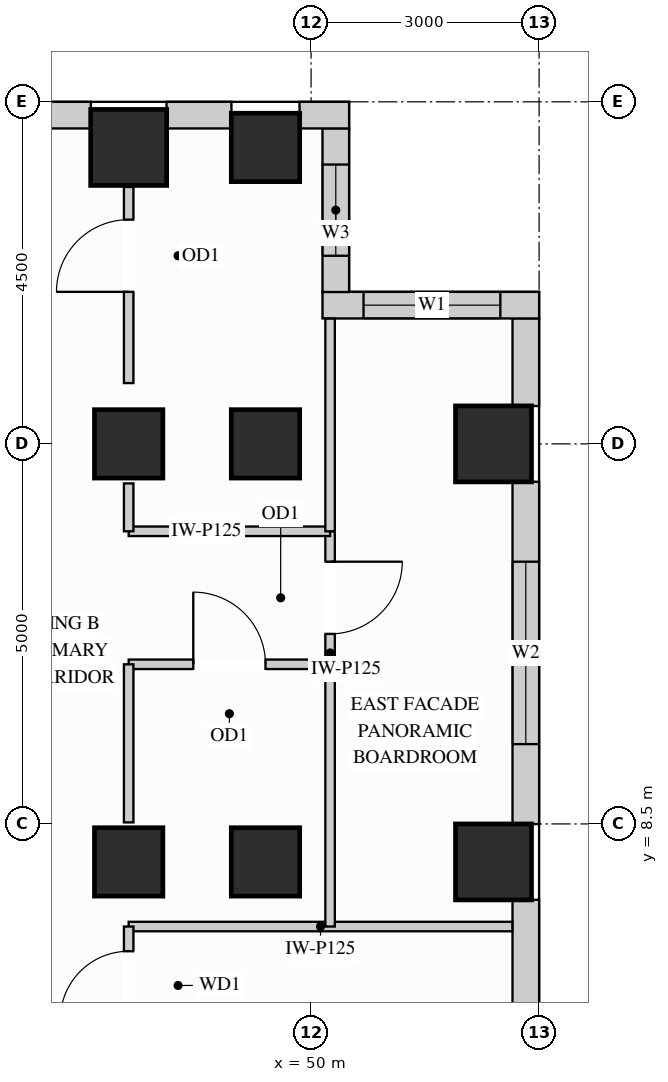
"""IFC4 building model, lengths in metres.
Left out: names, types, materials, properties, quantities, classifications, styles, units other than length and angle.
Written with IfcOpenShell. Run it as: python <this file> out.ifc"""

import sys

from ifc_helpers import new_model, si_unit, direction, frame, frame_2d, origin, origin_2d, place, context, subcontext, project, spatial, rectangle, extrude, source, transform, mapped, element, fill, save


model = new_model("IFC4")
c1 = context("Model", 3, precision=1e-05, world=origin(), true_north=direction((0.0, 1.0)))
c2 = subcontext(c1, "Body", "Model", "MODEL_VIEW")
j1 = project(units=[si_unit("LENGTHUNIT", "METRE"), si_unit("PLANEANGLEUNIT", "RADIAN")], contexts=[c1])
p1 = place(None, origin())
s1 = spatial("IfcSite", under=j1, at=p1, CompositionType="ELEMENT")
p2 = place(p1, origin())
s2 = spatial("IfcBuilding", under=s1, at=p2, CompositionType="ELEMENT")
p3 = place(p2, frame((0.0, 0.0, 189.9)))
s3 = spatial("IfcBuildingStorey", under=s2, at=p3, CompositionType="ELEMENT", Elevation=189.9)
m1 = source(origin(), c2, "Body", "SweptSolid", [
    extrude(rectangle(XDim=0.9, YDim=0.9, at=origin_2d()), origin(), (0.0, 0.0, 1.0), 3.4),
])
for number, where, z_axis, x_axis in (
    (1, (47.6, 13.5, 0.0), (0.0, 0.0, 1.0), (1.0, 0.0, 0.0)),
    (2, (47.6, 8.0, 0.0), (0.0, 0.0, 1.0), (1.0, 0.0, 0.0)),
    (3, (49.4, 13.5, 0.0), (0.0, 0.0, 1.0), (1.0, 0.0, 0.0)),
    (4, (49.4, 17.4, 0.0), (0.0, 0.0, 1.0), (1.0, 0.0, 0.0)),
    (5, (49.4, 8.0, 0.0), (0.0, 0.0, 1.0), (1.0, 0.0, 0.0)),
):
    element("IfcColumn", number, at=place(p3, frame(where, z_axis=z_axis, x_axis=x_axis)), inside=s3, PredefinedType="COLUMN", context=c2, shape_type="MappedRepresentation", body=[
        mapped(m1, transform((0.0, 0.0, 0.0), x_axis=(1.0, 0.0, 0.0), y_axis=(0.0, 1.0, 0.0), z_axis=(0.0, 0.0, 1.0))),
    ])
m2 = source(origin(), c2, "Body", "SweptSolid", [
    extrude(rectangle(XDim=1.0, YDim=1.0, at=origin_2d()), origin(), (0.0, 0.0, 1.0), 3.4),
])
for number, where, z_axis, x_axis in (
    (6, (47.6, 17.4, 0.0), (0.0, 0.0, 1.0), (1.0, 0.0, 0.0)),
    (7, (52.4, 13.5, 0.0), (0.0, 0.0, 1.0), (1.0, 0.0, 0.0)),
    (8, (52.4, 8.0, 0.0), (0.0, 0.0, 1.0), (1.0, 0.0, 0.0)),
):
    element("IfcColumn", number, at=place(p3, frame(where, z_axis=z_axis, x_axis=x_axis)), inside=s3, PredefinedType="COLUMN", context=c2, shape_type="MappedRepresentation", body=[
        mapped(m2, transform((0.0, 0.0, 0.0), x_axis=(1.0, 0.0, 0.0), y_axis=(0.0, 1.0, 0.0), z_axis=(0.0, 0.0, 1.0))),
    ])
m3 = source(origin(), c2, "Body", "SweptSolid", [
    extrude(rectangle(XDim=3.504, YDim=0.35, at=frame_2d((1.752, 0.0))), origin(), (0.0, 0.0, 1.0), 2.612),
])
p4 = place(p3, frame((52.825, 3.998, 0.0), z_axis=(0.0, 0.0, 1.0), x_axis=(0.0, 1.0, 0.0)))
e9 = element("IfcWall", 9, at=p4, inside=s3, PredefinedType="SOLIDWALL", context=c2, shape_type="MappedRepresentation", body=[
    mapped(m3, transform((0.0, 0.0, 0.0), x_axis=(1.0, 0.0, 0.0), y_axis=(0.0, 1.0, 0.0), z_axis=(0.0, 0.0, 1.0))),
])
p5 = place(p3, frame((52.825, 8.498, 0.0), z_axis=(0.0, 0.0, 1.0), x_axis=(0.0, 1.0, 0.0)))
e10 = element("IfcWall", 10, at=p5, inside=s3, PredefinedType="SOLIDWALL", context=c2, shape_type="SweptSolid", body=[
    extrude(rectangle(XDim=4.504, YDim=0.35, at=frame_2d((2.252, 0.0))), origin(), (0.0, 0.0, 1.0), 2.612),
])
p6 = place(p5, frame((1.052, 0.0, 0.78)))
e11 = element("IfcOpeningElement", 11, at=p6, cuts=e10, PredefinedType="OPENING", context=c2, shape_type="SweptSolid", body=[
    extrude(rectangle(XDim=2.4, YDim=1.652, at=frame_2d((1.2, 0.826))), frame((0.0, 0.185, 0.0), z_axis=(0.0, -1.0, 0.0), x_axis=(1.0, 0.0, 0.0)), (0.0, 0.0, 1.0), 0.37),
])
m4 = source(origin(), c2, "Body", "SweptSolid", [
    extrude(rectangle(XDim=1.154, YDim=0.35, at=frame_2d((0.577, 0.0))), origin(), (0.0, 0.0, 1.0), 3.385),
])
p7 = place(p3, frame((52.825, 13.998, 0.0), z_axis=(0.0, 0.0, 1.0), x_axis=(0.0, 1.0, 0.0)))
e12 = element("IfcWall", 12, at=p7, inside=s3, PredefinedType="SOLIDWALL", context=c2, shape_type="MappedRepresentation", body=[
    mapped(m4, transform((0.0, 0.0, 0.0), x_axis=(1.0, 0.0, 0.0), y_axis=(0.0, 1.0, 0.0), z_axis=(0.0, 0.0, 1.0))),
])
p8 = place(p3, frame((53.0, 15.325, 0.0), z_axis=(0.0, 0.0, 1.0), x_axis=(-1.0, 0.0, 0.0)))
e13 = element("IfcWall", 13, at=p8, inside=s3, PredefinedType="SOLIDWALL", context=c2, shape_type="SweptSolid", body=[
    extrude(rectangle(XDim=2.85, YDim=0.35, at=frame_2d((1.425, 0.0))), origin(), (0.0, 0.0, 1.0), 3.385),
])
p9 = place(p8, frame((0.51, 0.0, 0.78)))
e14 = element("IfcOpeningElement", 14, at=p9, cuts=e13, PredefinedType="OPENING", context=c2, shape_type="SweptSolid", body=[
    extrude(rectangle(XDim=1.8, YDim=2.1, at=frame_2d((0.9, 1.05))), frame((0.0, 0.185, 0.0), z_axis=(0.0, -1.0, 0.0), x_axis=(1.0, 0.0, 0.0)), (0.0, 0.0, 1.0), 0.37),
])
p10 = place(p3, frame((50.325, 15.498, 0.0), z_axis=(0.0, 0.0, 1.0), x_axis=(0.0, 1.0, 0.0)))
e15 = element("IfcWall", 15, at=p10, inside=s3, PredefinedType="SOLIDWALL", context=c2, shape_type="SweptSolid", body=[
    extrude(rectangle(XDim=2.154, YDim=0.35, at=frame_2d((1.077, 0.0))), origin(), (0.0, 0.0, 1.0), 3.385),
])
p11 = place(p10, frame((0.477, 0.0, 0.78)))
e16 = element("IfcOpeningElement", 16, at=p11, cuts=e15, PredefinedType="OPENING", context=c2, shape_type="SweptSolid", body=[
    extrude(rectangle(XDim=1.2, YDim=2.1, at=frame_2d((0.6, 1.05))), frame((0.0, 0.185, 0.0), z_axis=(0.0, -1.0, 0.0), x_axis=(1.0, 0.0, 0.0)), (0.0, 0.0, 1.0), 0.37),
])
m5 = source(origin(), c2, "Body", "SweptSolid", [
    extrude(rectangle(XDim=0.652, YDim=0.35, at=frame_2d((0.326, 0.0))), origin(), (0.0, 0.0, 1.0), 3.385),
])
p12 = place(p3, frame((50.5, 17.825, 0.0), z_axis=(0.0, 0.0, 1.0), x_axis=(-1.0, 0.0, 0.0)))
e17 = element("IfcWall", 17, at=p12, inside=s3, PredefinedType="SOLIDWALL", context=c2, shape_type="MappedRepresentation", body=[
    mapped(m5, transform((0.0, 0.0, 0.0), x_axis=(1.0, 0.0, 0.0), y_axis=(0.0, 1.0, 0.0), z_axis=(0.0, 0.0, 1.0))),
])
m6 = source(origin(), c2, "Body", "SweptSolid", [
    extrude(rectangle(XDim=0.854, YDim=0.35, at=frame_2d((0.427, 0.0))), origin(), (0.0, 0.0, 1.0), 3.385),
])
p13 = place(p3, frame((48.952, 17.825, 0.0), z_axis=(0.0, 0.0, 1.0), x_axis=(-1.0, 0.0, 0.0)))
e18 = element("IfcWall", 18, at=p13, inside=s3, PredefinedType="SOLIDWALL", context=c2, shape_type="MappedRepresentation", body=[
    mapped(m6, transform((0.0, 0.0, 0.0), x_axis=(1.0, 0.0, 0.0), y_axis=(0.0, 1.0, 0.0), z_axis=(0.0, 0.0, 1.0))),
])
p14 = place(p3, frame((47.102, 17.825, 0.0), z_axis=(0.0, 0.0, 1.0), x_axis=(-1.0, 0.0, 0.0)))
e19 = element("IfcWall", 19, at=p14, inside=s3, PredefinedType="SOLIDWALL", context=c2, shape_type="SweptSolid", body=[
    extrude(rectangle(XDim=6.604, YDim=0.35, at=frame_2d((3.302, 0.0))), origin(), (0.0, 0.0, 1.0), 2.612),
])
p15 = place(p14, frame((1.849, 0.0, 0.78)))
e20 = element("IfcOpeningElement", 20, at=p15, cuts=e19, PredefinedType="OPENING", context=c2, shape_type="SweptSolid", body=[
    extrude(rectangle(XDim=1.8, YDim=1.652, at=frame_2d((0.9, 0.826))), frame((0.0, 0.185, 0.0), z_axis=(0.0, -1.0, 0.0), x_axis=(1.0, 0.0, 0.0)), (0.0, 0.0, 1.0), 0.37),
])
p16 = place(p14, frame((4.067, 0.0, 0.78)))
e21 = element("IfcOpeningElement", 21, at=p16, cuts=e19, PredefinedType="OPENING", context=c2, shape_type="SweptSolid", body=[
    extrude(rectangle(XDim=1.8, YDim=1.652, at=frame_2d((0.9, 0.826))), frame((0.0, 0.185, 0.0), z_axis=(0.0, -1.0, 0.0), x_axis=(1.0, 0.0, 0.0)), (0.0, 0.0, 1.0), 0.37),
])
p17 = place(p3, frame((50.25, 10.6, 0.0), z_axis=(0.0, 0.0, 1.0), x_axis=(0.0, 1.0, 0.0)))
e22 = element("IfcWall", 22, at=p17, inside=s3, PredefinedType="PARTITIONING", context=c2, shape_type="SweptSolid", body=[
    extrude(rectangle(XDim=1.75, YDim=0.125, at=frame_2d((0.875, 0.0))), origin(), (0.0, 0.0, 1.0), 3.385),
])
p18 = place(p17, frame((0.4, 0.0, 0.0)))
e23 = element("IfcOpeningElement", 23, at=p18, cuts=e22, PredefinedType="OPENING", context=c2, shape_type="SweptSolid", body=[
    extrude(rectangle(XDim=0.95, YDim=2.15, at=frame_2d((0.475, 1.075))), frame((0.0, 0.073, 0.0), z_axis=(0.0, -1.0, 0.0), x_axis=(1.0, 0.0, 0.0)), (0.0, 0.0, 1.0), 0.145),
])
m7 = source(origin(), c2, "Body", "SweptSolid", [
    extrude(rectangle(XDim=5.048, YDim=0.125, at=frame_2d((2.524, 0.0))), origin(), (0.0, 0.0, 1.0), 3.385),
])
p19 = place(p3, frame((47.6, 7.15, 0.0), z_axis=(0.0, 0.0, 1.0), x_axis=(1.0, 0.0, 0.0)))
e24 = element("IfcWall", 24, at=p19, inside=s3, PredefinedType="PARTITIONING", context=c2, shape_type="MappedRepresentation", body=[
    mapped(m7, transform((0.0, 0.0, 0.0), x_axis=(1.0, 0.0, 0.0), y_axis=(0.0, 1.0, 0.0), z_axis=(0.0, 0.0, 1.0))),
])
m8 = source(origin(), c2, "Body", "SweptSolid", [
    extrude(rectangle(XDim=2.65, YDim=0.125, at=frame_2d((1.325, 0.0))), origin(), (0.0, 0.0, 1.0), 3.385),
])
p20 = place(p3, frame((47.6, 12.35, 0.0), z_axis=(0.0, 0.0, 1.0), x_axis=(1.0, 0.0, 0.0)))
e25 = element("IfcWall", 25, at=p20, inside=s3, PredefinedType="PARTITIONING", context=c2, shape_type="MappedRepresentation", body=[
    mapped(m8, transform((0.0, 0.0, 0.0), x_axis=(1.0, 0.0, 0.0), y_axis=(0.0, 1.0, 0.0), z_axis=(0.0, 0.0, 1.0))),
])
p21 = place(p3, frame((47.6, 10.6, 0.0), z_axis=(0.0, 0.0, 1.0), x_axis=(1.0, 0.0, 0.0)))
e26 = element("IfcWall", 26, at=p21, inside=s3, PredefinedType="PARTITIONING", context=c2, shape_type="SweptSolid", body=[
    extrude(rectangle(XDim=2.65, YDim=0.125, at=frame_2d((1.325, 0.0))), origin(), (0.0, 0.0, 1.0), 2.773),
])
p22 = place(p21, frame((0.85, 0.0, 0.0)))
e27 = element("IfcOpeningElement", 27, at=p22, cuts=e26, PredefinedType="OPENING", context=c2, shape_type="SweptSolid", body=[
    extrude(rectangle(XDim=0.95, YDim=2.15, at=frame_2d((0.475, 1.075))), frame((0.0, 0.073, 0.0), z_axis=(0.0, -1.0, 0.0), x_axis=(1.0, 0.0, 0.0)), (0.0, 0.0, 1.0), 0.145),
])
m9 = source(origin(), c2, "Body", "SweptSolid", [
    extrude(rectangle(XDim=3.45, YDim=0.125, at=frame_2d((1.725, 0.0))), origin(), (0.0, 0.0, 1.0), 3.385),
])
p23 = place(p3, frame((50.25, 7.15, 0.0), z_axis=(0.0, 0.0, 1.0), x_axis=(0.0, 1.0, 0.0)))
e28 = element("IfcWall", 28, at=p23, inside=s3, PredefinedType="PARTITIONING", context=c2, shape_type="MappedRepresentation", body=[
    mapped(m9, transform((0.0, 0.0, 0.0), x_axis=(1.0, 0.0, 0.0), y_axis=(0.0, 1.0, 0.0), z_axis=(0.0, 0.0, 1.0))),
])
m10 = source(origin(), c2, "Body", "SweptSolid", [
    extrude(rectangle(XDim=2.798, YDim=0.125, at=frame_2d((1.399, 0.0))), origin(), (0.0, 0.0, 1.0), 3.385),
])
p24 = place(p3, frame((50.25, 12.35, 0.0), z_axis=(0.0, 0.0, 1.0), x_axis=(0.0, 1.0, 0.0)))
e29 = element("IfcWall", 29, at=p24, inside=s3, PredefinedType="PARTITIONING", context=c2, shape_type="MappedRepresentation", body=[
    mapped(m10, transform((0.0, 0.0, 0.0), x_axis=(1.0, 0.0, 0.0), y_axis=(0.0, 1.0, 0.0), z_axis=(0.0, 0.0, 1.0))),
])
m11 = source(origin(), c2, "Body", "SweptSolid", [
    extrude(rectangle(XDim=2.08, YDim=0.125, at=frame_2d((1.04, 0.0))), origin(), (0.0, 0.0, 1.0), 2.773),
])
p25 = place(p3, frame((47.6, 8.52, 0.0), z_axis=(0.0, 0.0, 1.0), x_axis=(0.0, 1.0, 0.0)))
e30 = element("IfcWall", 30, at=p25, inside=s3, PredefinedType="PARTITIONING", context=c2, shape_type="MappedRepresentation", body=[
    mapped(m11, transform((0.0, 0.0, 0.0), x_axis=(1.0, 0.0, 0.0), y_axis=(0.0, 1.0, 0.0), z_axis=(0.0, 0.0, 1.0))),
])
p26 = place(p3, frame((47.6, 14.3, 0.0), z_axis=(0.0, 0.0, 1.0), x_axis=(0.0, 1.0, 0.0)))
e31 = element("IfcWall", 31, at=p26, inside=s3, PredefinedType="PARTITIONING", context=c2, shape_type="SweptSolid", body=[
    extrude(rectangle(XDim=2.58, YDim=0.125, at=frame_2d((1.29, 0.0))), origin(), (0.0, 0.0, 1.0), 2.773),
])
p27 = place(p26, frame((1.2, 0.0, 0.0)))
e32 = element("IfcOpeningElement", 32, at=p27, cuts=e31, PredefinedType="OPENING", context=c2, shape_type="SweptSolid", body=[
    extrude(rectangle(XDim=0.95, YDim=2.15, at=frame_2d((0.475, 1.075))), frame((0.0, 0.073, 0.0), z_axis=(0.0, -1.0, 0.0), x_axis=(1.0, 0.0, 0.0)), (0.0, 0.0, 1.0), 0.145),
])
m12 = source(origin(), c2, "Body", "SweptSolid", [
    extrude(rectangle(XDim=0.63, YDim=0.125, at=frame_2d((0.315, 0.0))), origin(), (0.0, 0.0, 1.0), 2.773),
])
p28 = place(p3, frame((47.6, 12.35, 0.0), z_axis=(0.0, 0.0, 1.0), x_axis=(0.0, 1.0, 0.0)))
e33 = element("IfcWall", 33, at=p28, inside=s3, PredefinedType="PARTITIONING", context=c2, shape_type="MappedRepresentation", body=[
    mapped(m12, transform((0.0, 0.0, 0.0), x_axis=(1.0, 0.0, 0.0), y_axis=(0.0, 1.0, 0.0), z_axis=(0.0, 0.0, 1.0))),
])
p29 = place(p3, frame((47.6, 5.65, 0.0), z_axis=(0.0, 0.0, 1.0), x_axis=(0.0, 1.0, 0.0)))
e34 = element("IfcWall", 34, at=p29, inside=s3, PredefinedType="PARTITIONING", context=c2, shape_type="SweptSolid", body=[
    extrude(rectangle(XDim=1.5, YDim=0.125, at=frame_2d((0.75, 0.0))), origin(), (0.0, 0.0, 1.0), 2.773),
])
p30 = place(p29, frame((0.275, 0.0, 0.0)))
e35 = element("IfcOpeningElement", 35, at=p30, cuts=e34, PredefinedType="OPENING", context=c2, shape_type="SweptSolid", body=[
    extrude(rectangle(XDim=0.9, YDim=2.15, at=frame_2d((0.45, 1.075))), frame((0.0, 0.073, 0.0), z_axis=(0.0, -1.0, 0.0), x_axis=(1.0, 0.0, 0.0)), (0.0, 0.0, 1.0), 0.145),
])
m13 = source(origin(), c2, "Body", "SweptSolid", [
    extrude(rectangle(XDim=0.95, YDim=2.15, at=frame_2d((0.475, 1.075))), frame((0.0, 0.025, 0.0), z_axis=(0.0, -1.0, 0.0), x_axis=(1.0, 0.0, 0.0)), (0.0, 0.0, 1.0), 0.05),
])
p31 = place(p22, origin())
e36 = element("IfcDoor", 36, at=p31, inside=s3, OperationType="SINGLE_SWING_LEFT", PredefinedType="DOOR", context=c2, shape_type="MappedRepresentation", body=[
    mapped(m13, transform((0.0, 0.0, 0.0), x_axis=(1.0, 0.0, 0.0), y_axis=(0.0, 1.0, 0.0), z_axis=(0.0, 0.0, 1.0))),
])
fill(e27, e36)
p32 = place(p18, origin())
e37 = element("IfcDoor", 37, at=p32, inside=s3, OperationType="SINGLE_SWING_RIGHT", PredefinedType="DOOR", context=c2, shape_type="MappedRepresentation", body=[
    mapped(m13, transform((0.0, 0.0, 0.0), x_axis=(1.0, 0.0, 0.0), y_axis=(0.0, 1.0, 0.0), z_axis=(0.0, 0.0, 1.0))),
])
fill(e23, e37)
p33 = place(p27, origin())
e38 = element("IfcDoor", 38, at=p33, inside=s3, OperationType="SINGLE_SWING_LEFT", PredefinedType="DOOR", context=c2, shape_type="MappedRepresentation", body=[
    mapped(m13, transform((0.0, 0.0, 0.0), x_axis=(1.0, 0.0, 0.0), y_axis=(0.0, 1.0, 0.0), z_axis=(0.0, 0.0, 1.0))),
])
fill(e32, e38)
m14 = source(origin(), c2, "Body", "SweptSolid", [
    extrude(rectangle(XDim=0.9, YDim=2.15, at=frame_2d((0.45, 1.075))), frame((0.0, 0.025, 0.0), z_axis=(0.0, -1.0, 0.0), x_axis=(1.0, 0.0, 0.0)), (0.0, 0.0, 1.0), 0.05),
])
p34 = place(p30, origin())
e39 = element("IfcDoor", 39, at=p34, inside=s3, OperationType="SINGLE_SWING_LEFT", PredefinedType="DOOR", context=c2, shape_type="MappedRepresentation", body=[
    mapped(m14, transform((0.0, 0.0, 0.0), x_axis=(1.0, 0.0, 0.0), y_axis=(0.0, 1.0, 0.0), z_axis=(0.0, 0.0, 1.0))),
])
fill(e35, e39)
m15 = source(origin(), c2, "Body", "SweptSolid", [
    extrude(rectangle(XDim=1.8, YDim=2.1, at=frame_2d((0.9, 1.05))), frame((0.0, 0.03, 0.0), z_axis=(0.0, -1.0, 0.0), x_axis=(1.0, 0.0, 0.0)), (0.0, 0.0, 1.0), 0.06),
])
p35 = place(p9, origin())
e40 = element("IfcWindow", 40, at=p35, inside=s3, PartitioningType="SINGLE_PANEL", PredefinedType="WINDOW", context=c2, shape_type="MappedRepresentation", body=[
    mapped(m15, transform((0.0, 0.0, 0.0), x_axis=(1.0, 0.0, 0.0), y_axis=(0.0, 1.0, 0.0), z_axis=(0.0, 0.0, 1.0))),
])
fill(e14, e40)
m16 = source(origin(), c2, "Body", "SweptSolid", [
    extrude(rectangle(XDim=2.4, YDim=1.652, at=frame_2d((1.2, 0.826))), frame((0.0, 0.03, 0.0), z_axis=(0.0, -1.0, 0.0), x_axis=(1.0, 0.0, 0.0)), (0.0, 0.0, 1.0), 0.06),
])
p36 = place(p6, origin())
e41 = element("IfcWindow", 41, at=p36, inside=s3, PartitioningType="SINGLE_PANEL", PredefinedType="WINDOW", context=c2, shape_type="MappedRepresentation", body=[
    mapped(m16, transform((0.0, 0.0, 0.0), x_axis=(1.0, 0.0, 0.0), y_axis=(0.0, 1.0, 0.0), z_axis=(0.0, 0.0, 1.0))),
])
fill(e11, e41)
m17 = source(origin(), c2, "Body", "SweptSolid", [
    extrude(rectangle(XDim=1.2, YDim=2.1, at=frame_2d((0.6, 1.05))), frame((0.0, 0.03, 0.0), z_axis=(0.0, -1.0, 0.0), x_axis=(1.0, 0.0, 0.0)), (0.0, 0.0, 1.0), 0.06),
])
p37 = place(p11, origin())
e42 = element("IfcWindow", 42, at=p37, inside=s3, PartitioningType="SINGLE_PANEL", PredefinedType="WINDOW", context=c2, shape_type="MappedRepresentation", body=[
    mapped(m17, transform((0.0, 0.0, 0.0), x_axis=(1.0, 0.0, 0.0), y_axis=(0.0, 1.0, 0.0), z_axis=(0.0, 0.0, 1.0))),
])
fill(e16, e42)
save(model, sys.argv[1])
